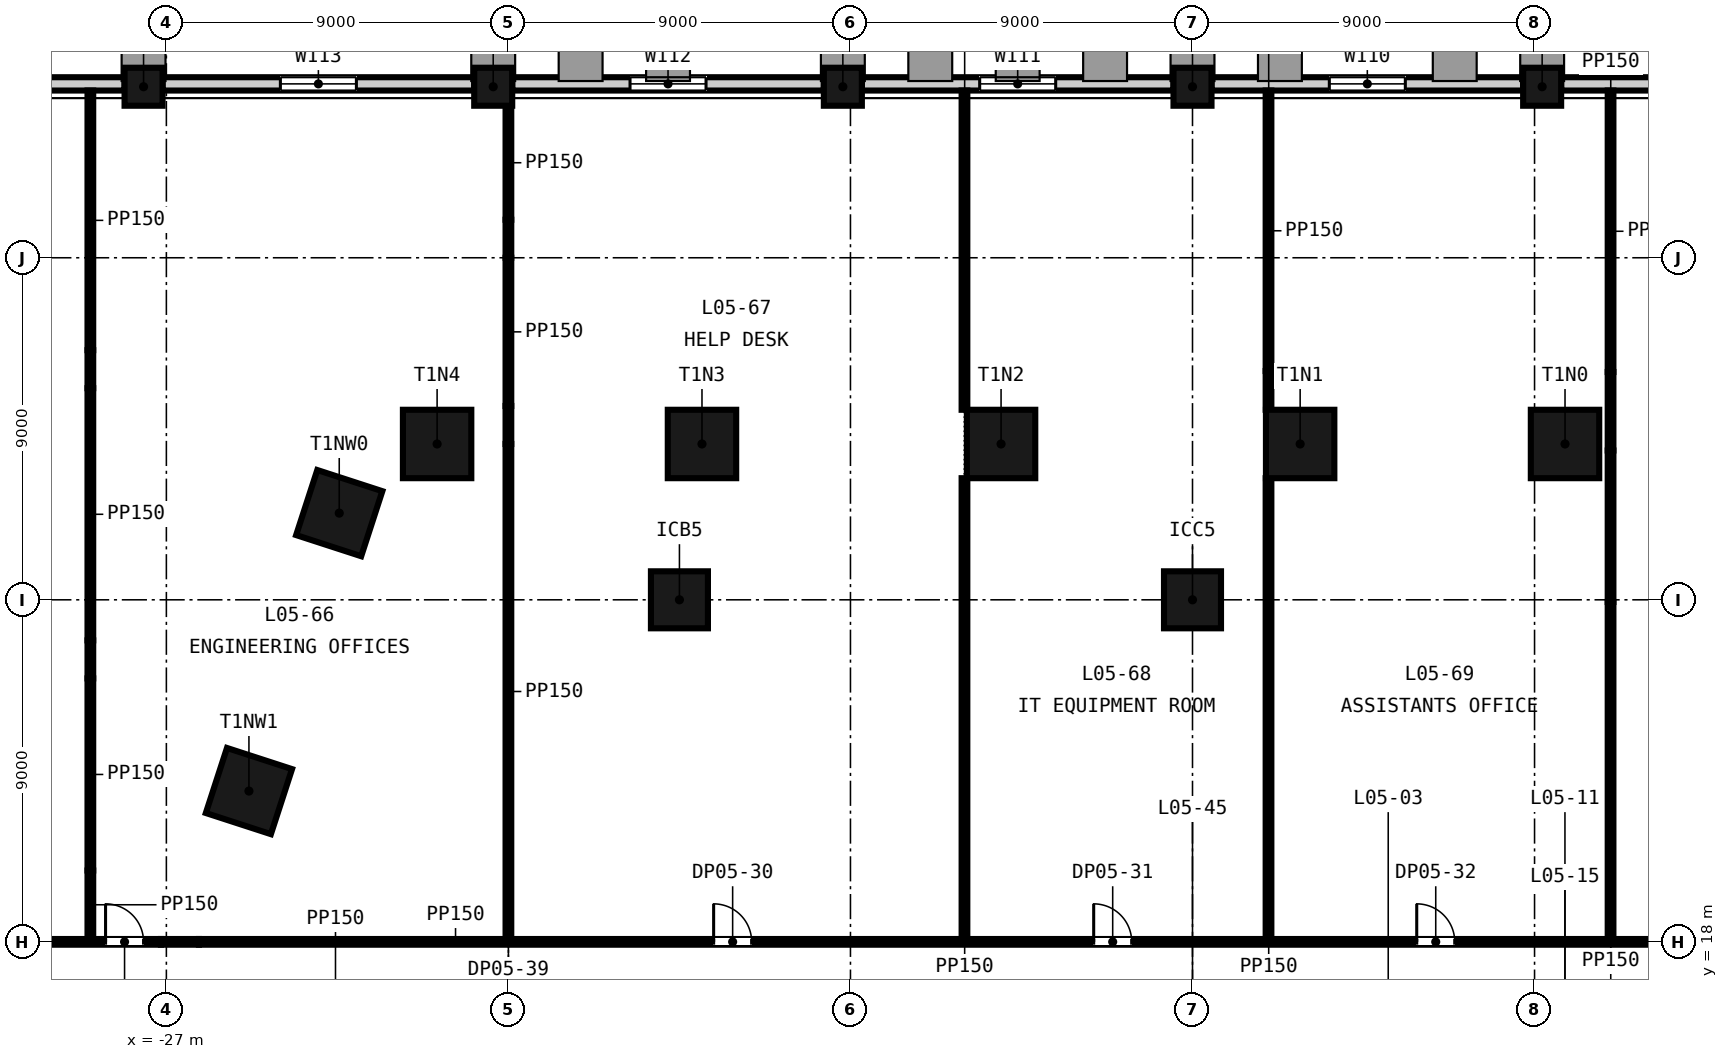
"""IFC4 building model, lengths in metres.
Left out: names, types, materials, properties, quantities, classifications, styles, units other than length and angle.
Written with IfcOpenShell. Run it as: python <this file> out.ifc"""

import sys

from ifc_helpers import new_model, si_unit, direction, frame, frame_2d, origin, origin_2d, place, context, subcontext, project, spatial, rectangle, extrude, element, fill, save


model = new_model("IFC4")
c1 = context("Model", 3, precision=1e-05, world=origin(), true_north=direction((0.0, 1.0)))
c2 = subcontext(c1, "Body", "Model", "MODEL_VIEW")
j1 = project(units=[si_unit("LENGTHUNIT", "METRE"), si_unit("PLANEANGLEUNIT", "RADIAN")], contexts=[c1])
p1 = place(None, origin())
s1 = spatial("IfcSite", under=j1, at=p1, CompositionType="ELEMENT")
p2 = place(p1, origin())
s2 = spatial("IfcBuilding", under=s1, at=p2, CompositionType="ELEMENT")
p3 = place(p2, frame((0.0, 0.0, 31.5)))
s3 = spatial("IfcBuildingStorey", under=s2, at=p3, CompositionType="ELEMENT", Elevation=31.5)
for number, where, z_axis, x_axis in (
    (1, (9.802, 31.1, -0.3), (0.0, 0.0, 1.0), (-1.0, 0.0, 0.0)),
    (2, (2.832, 31.1, -0.3), (0.0, 0.0, 1.0), (-1.0, 0.0, 0.0)),
    (3, (-5.037, 31.1, -0.3), (0.0, 0.0, 1.0), (-1.0, 0.0, 0.0)),
    (4, (-12.907, 31.1, -0.3), (0.0, 0.0, 1.0), (-1.0, 0.0, 0.0)),
    (5, (-19.876, 31.1, -0.3), (0.0, 0.0, 1.0), (-1.0, 0.0, 0.0)),
    (6, (-22.451, 29.281, -0.3), (0.0, 0.0, 1.0), (-0.309, -0.951, 0.0)),
    (7, (-24.827, 21.968, -0.3), (0.0, 0.0, 1.0), (-0.309, -0.951, 0.0)),
):
    element("IfcColumn", number, at=place(p3, frame(where, z_axis=z_axis, x_axis=x_axis)), inside=s3, PredefinedType="COLUMN", context=c2, shape_type="SweptSolid", body=[
        extrude(rectangle(XDim=1.8, YDim=1.8, at=origin_2d()), origin(), (0.0, 0.0, 1.0), 4.65),
    ])
for number, where, z_axis, x_axis in (
    (8, (-13.5, 27.0, -0.3), (0.0, 0.0, 1.0), (1.0, 0.0, 0.0)),
    (9, (0.0, 27.0, -0.3), (0.0, 0.0, 1.0), (1.0, 0.0, 0.0)),
):
    element("IfcColumn", number, at=place(p3, frame(where, z_axis=z_axis, x_axis=x_axis)), inside=s3, PredefinedType="COLUMN", context=c2, shape_type="SweptSolid", body=[
        extrude(rectangle(XDim=1.5, YDim=1.5, at=origin_2d()), origin(), (0.0, 0.0, 1.0), 4.65),
    ])
for number, where, z_axis, x_axis in (
    (10, (9.2, 40.5, -0.3), (0.0, 0.0, 1.0), (-1.0, 0.0, 0.0)),
    (11, (0.0, 40.5, -0.3), (0.0, 0.0, 1.0), (-1.0, 0.0, 0.0)),
    (12, (-9.2, 40.5, -0.3), (0.0, 0.0, 1.0), (-1.0, 0.0, 0.0)),
    (13, (-18.4, 40.5, -0.3), (0.0, 0.0, 1.0), (-1.0, 0.0, 0.0)),
    (14, (-27.6, 40.5, -0.3), (0.0, 0.0, 1.0), (-1.0, 0.0, 0.0)),
):
    element("IfcColumn", number, at=place(p3, frame(where, z_axis=z_axis, x_axis=x_axis)), inside=s3, PredefinedType="COLUMN", context=c2, shape_type="SweptSolid", body=[
        extrude(rectangle(XDim=1.0, YDim=1.0, at=origin_2d()), origin(), (0.0, 0.0, 1.0), 4.65),
    ])
p4 = place(p3, frame((17.9, 40.575, -0.3), z_axis=(0.0, 0.0, 1.0), x_axis=(-1.0, 0.0, 0.0)))
e15 = element("IfcWall", 15, at=p4, inside=s3, PredefinedType="SOLIDWALL", context=c2, shape_type="SweptSolid", body=[
    extrude(rectangle(XDim=8.2, YDim=0.35, at=frame_2d((4.1, 0.0))), origin(), (0.0, 0.0, 1.0), 3.75),
])
p5 = place(p4, frame((3.1, 0.0, 1.2)))
e16 = element("IfcOpeningElement", 16, at=p5, cuts=e15, PredefinedType="OPENING", context=c2, shape_type="SweptSolid", body=[
    extrude(rectangle(XDim=2.0, YDim=2.5, at=frame_2d((1.0, 1.25))), frame((0.0, 0.185, 0.0), z_axis=(0.0, -1.0, 0.0), x_axis=(1.0, 0.0, 0.0)), (0.0, 0.0, 1.0), 0.37),
])
p6 = place(p3, frame((8.7, 40.575, -0.3), z_axis=(0.0, 0.0, 1.0), x_axis=(-1.0, 0.0, 0.0)))
e17 = element("IfcWall", 17, at=p6, inside=s3, PredefinedType="SOLIDWALL", context=c2, shape_type="SweptSolid", body=[
    extrude(rectangle(XDim=8.2, YDim=0.35, at=frame_2d((4.1, 0.0))), origin(), (0.0, 0.0, 1.0), 3.75),
])
p7 = place(p6, frame((3.1, 0.0, 1.2)))
e18 = element("IfcOpeningElement", 18, at=p7, cuts=e17, PredefinedType="OPENING", context=c2, shape_type="SweptSolid", body=[
    extrude(rectangle(XDim=2.0, YDim=2.5, at=frame_2d((1.0, 1.25))), frame((0.0, 0.185, 0.0), z_axis=(0.0, -1.0, 0.0), x_axis=(1.0, 0.0, 0.0)), (0.0, 0.0, 1.0), 0.37),
])
p8 = place(p3, frame((-0.5, 40.575, -0.3), z_axis=(0.0, 0.0, 1.0), x_axis=(-1.0, 0.0, 0.0)))
e19 = element("IfcWall", 19, at=p8, inside=s3, PredefinedType="SOLIDWALL", context=c2, shape_type="SweptSolid", body=[
    extrude(rectangle(XDim=8.2, YDim=0.35, at=frame_2d((4.1, 0.0))), origin(), (0.0, 0.0, 1.0), 3.75),
])
p9 = place(p8, frame((3.1, 0.0, 1.2)))
e20 = element("IfcOpeningElement", 20, at=p9, cuts=e19, PredefinedType="OPENING", context=c2, shape_type="SweptSolid", body=[
    extrude(rectangle(XDim=2.0, YDim=2.5, at=frame_2d((1.0, 1.25))), frame((0.0, 0.185, 0.0), z_axis=(0.0, -1.0, 0.0), x_axis=(1.0, 0.0, 0.0)), (0.0, 0.0, 1.0), 0.37),
])
p10 = place(p3, frame((-9.7, 40.575, -0.3), z_axis=(0.0, 0.0, 1.0), x_axis=(-1.0, 0.0, 0.0)))
e21 = element("IfcWall", 21, at=p10, inside=s3, PredefinedType="SOLIDWALL", context=c2, shape_type="SweptSolid", body=[
    extrude(rectangle(XDim=8.2, YDim=0.35, at=frame_2d((4.1, 0.0))), origin(), (0.0, 0.0, 1.0), 3.75),
])
p11 = place(p10, frame((3.1, 0.0, 1.2)))
e22 = element("IfcOpeningElement", 22, at=p11, cuts=e21, PredefinedType="OPENING", context=c2, shape_type="SweptSolid", body=[
    extrude(rectangle(XDim=2.0, YDim=2.5, at=frame_2d((1.0, 1.25))), frame((0.0, 0.185, 0.0), z_axis=(0.0, -1.0, 0.0), x_axis=(1.0, 0.0, 0.0)), (0.0, 0.0, 1.0), 0.37),
])
p12 = place(p3, frame((-18.9, 40.575, -0.3), z_axis=(0.0, 0.0, 1.0), x_axis=(-1.0, 0.0, 0.0)))
e23 = element("IfcWall", 23, at=p12, inside=s3, PredefinedType="SOLIDWALL", context=c2, shape_type="SweptSolid", body=[
    extrude(rectangle(XDim=8.2, YDim=0.35, at=frame_2d((4.1, 0.0))), origin(), (0.0, 0.0, 1.0), 3.75),
])
p13 = place(p12, frame((3.1, 0.0, 1.2)))
e24 = element("IfcOpeningElement", 24, at=p13, cuts=e23, PredefinedType="OPENING", context=c2, shape_type="SweptSolid", body=[
    extrude(rectangle(XDim=2.0, YDim=2.5, at=frame_2d((1.0, 1.25))), frame((0.0, 0.185, 0.0), z_axis=(0.0, -1.0, 0.0), x_axis=(1.0, 0.0, 0.0)), (0.0, 0.0, 1.0), 0.37),
])
p14 = place(p3, frame((-28.1, 40.575, -0.3), z_axis=(0.0, 0.0, 1.0), x_axis=(-1.0, 0.0, 0.0)))
e25 = element("IfcWall", 25, at=p14, inside=s3, PredefinedType="SOLIDWALL", context=c2, shape_type="SweptSolid", body=[
    extrude(rectangle(XDim=8.2, YDim=0.35, at=frame_2d((4.1, 0.0))), origin(), (0.0, 0.0, 1.0), 3.75),
])
p15 = place(p14, frame((3.1, 0.0, 1.2)))
e26 = element("IfcOpeningElement", 26, at=p15, cuts=e25, PredefinedType="OPENING", context=c2, shape_type="SweptSolid", body=[
    extrude(rectangle(XDim=2.0, YDim=2.5, at=frame_2d((1.0, 1.25))), frame((0.0, 0.185, 0.0), z_axis=(0.0, -1.0, 0.0), x_axis=(1.0, 0.0, 0.0)), (0.0, 0.0, 1.0), 0.37),
])
p16 = place(p3, frame((-35.879, 18.0, 0.0), z_axis=(0.0, 0.0, 1.0), x_axis=(1.0, 0.0, 0.0)))
e27 = element("IfcWall", 27, at=p16, inside=s3, PredefinedType="PARTITIONING", context=c2, shape_type="SweptSolid", body=[
    extrude(rectangle(XDim=8.736, YDim=0.15, at=frame_2d((4.368, 0.0))), origin(), (0.0, 0.0, 1.0), 4.35),
])
p17 = place(p16, frame((7.279, 0.0, 0.0)))
e28 = element("IfcOpeningElement", 28, at=p17, cuts=e27, PredefinedType="OPENING", context=c2, shape_type="SweptSolid", body=[
    extrude(rectangle(XDim=1.0, YDim=2.1, at=frame_2d((0.5, 1.05))), frame((0.0, 0.085, 0.0), z_axis=(0.0, -1.0, 0.0), x_axis=(1.0, 0.0, 0.0)), (0.0, 0.0, 1.0), 0.17),
])
p18 = place(p3, frame((-27.142, 18.0, 0.0), z_axis=(0.0, 0.0, 1.0), x_axis=(1.0, 0.0, 0.0)))
e29 = element("IfcWall", 29, at=p18, inside=s3, PredefinedType="PARTITIONING", context=c2, shape_type="SweptSolid", body=[
    extrude(rectangle(XDim=1.0, YDim=0.15, at=frame_2d((0.5, 0.0))), origin(), (0.0, 0.0, 1.0), 3.5),
])
p19 = place(p3, frame((-26.142, 18.0, 0.0), z_axis=(0.0, 0.0, 1.0), x_axis=(1.0, 0.0, 0.0)))
e30 = element("IfcWall", 30, at=p19, inside=s3, PredefinedType="PARTITIONING", context=c2, shape_type="SweptSolid", body=[
    extrude(rectangle(XDim=44.067, YDim=0.15, at=frame_2d((22.034, 0.0))), origin(), (0.0, 0.0, 1.0), 4.35),
])
p20 = place(p19, frame((13.542, 0.0, 0.0)))
e31 = element("IfcOpeningElement", 31, at=p20, cuts=e30, PredefinedType="OPENING", context=c2, shape_type="SweptSolid", body=[
    extrude(rectangle(XDim=1.0, YDim=2.1, at=frame_2d((0.5, 1.05))), frame((0.0, 0.085, 0.0), z_axis=(0.0, -1.0, 0.0), x_axis=(1.0, 0.0, 0.0)), (0.0, 0.0, 1.0), 0.17),
])
p21 = place(p19, frame((23.542, 0.0, 0.0)))
e32 = element("IfcOpeningElement", 32, at=p21, cuts=e30, PredefinedType="OPENING", context=c2, shape_type="SweptSolid", body=[
    extrude(rectangle(XDim=1.0, YDim=2.1, at=frame_2d((0.5, 1.05))), frame((0.0, 0.085, 0.0), z_axis=(0.0, -1.0, 0.0), x_axis=(1.0, 0.0, 0.0)), (0.0, 0.0, 1.0), 0.17),
])
p22 = place(p19, frame((32.042, 0.0, 0.0)))
e33 = element("IfcOpeningElement", 33, at=p22, cuts=e30, PredefinedType="OPENING", context=c2, shape_type="SweptSolid", body=[
    extrude(rectangle(XDim=1.0, YDim=2.1, at=frame_2d((0.5, 1.05))), frame((0.0, 0.085, 0.0), z_axis=(0.0, -1.0, 0.0), x_axis=(1.0, 0.0, 0.0)), (0.0, 0.0, 1.0), 0.17),
])
p23 = place(p19, frame((39.042, 0.0, 0.0)))
e34 = element("IfcOpeningElement", 34, at=p23, cuts=e30, PredefinedType="OPENING", context=c2, shape_type="SweptSolid", body=[
    extrude(rectangle(XDim=1.0, YDim=2.1, at=frame_2d((0.5, 1.05))), frame((0.0, 0.085, 0.0), z_axis=(0.0, -1.0, 0.0), x_axis=(1.0, 0.0, 0.0)), (0.0, 0.0, 1.0), 0.17),
])
p24 = place(p19, frame((42.542, 0.0, 0.0)))
e35 = element("IfcOpeningElement", 35, at=p24, cuts=e30, PredefinedType="OPENING", context=c2, shape_type="SweptSolid", body=[
    extrude(rectangle(XDim=1.0, YDim=2.1, at=frame_2d((0.5, 1.05))), frame((0.0, 0.085, 0.0), z_axis=(0.0, -1.0, 0.0), x_axis=(1.0, 0.0, 0.0)), (0.0, 0.0, 1.0), 0.17),
])
p25 = place(p3, frame((-29.0, 18.075, 0.0), z_axis=(0.0, 0.0, 1.0), x_axis=(0.0, 1.0, 0.0)))
e36 = element("IfcWall", 36, at=p25, inside=s3, PredefinedType="PARTITIONING", context=c2, shape_type="SweptSolid", body=[
    extrude(rectangle(XDim=1.802, YDim=0.15, at=frame_2d((0.901, 0.0))), origin(), (0.0, 0.0, 1.0), 3.261),
])
p26 = place(p3, frame((-29.0, 19.877, 0.0), z_axis=(0.0, 0.0, 1.0), x_axis=(0.0, 1.0, 0.0)))
e37 = element("IfcWall", 37, at=p26, inside=s3, PredefinedType="PARTITIONING", context=c2, shape_type="SweptSolid", body=[
    extrude(rectangle(XDim=5.055, YDim=0.15, at=frame_2d((2.528, 0.0))), origin(), (0.0, 0.0, 1.0), 4.35),
])
p27 = place(p3, frame((-29.0, 24.932, 0.0), z_axis=(0.0, 0.0, 1.0), x_axis=(0.0, 1.0, 0.0)))
e38 = element("IfcWall", 38, at=p27, inside=s3, PredefinedType="PARTITIONING", context=c2, shape_type="SweptSolid", body=[
    extrude(rectangle(XDim=1.0, YDim=0.15, at=frame_2d((0.5, 0.0))), origin(), (0.0, 0.0, 1.0), 3.261),
])
p28 = place(p3, frame((-29.0, 25.932, 0.0), z_axis=(0.0, 0.0, 1.0), x_axis=(0.0, 1.0, 0.0)))
e39 = element("IfcWall", 39, at=p28, inside=s3, PredefinedType="PARTITIONING", context=c2, shape_type="SweptSolid", body=[
    extrude(rectangle(XDim=6.636, YDim=0.15, at=frame_2d((3.318, 0.0))), origin(), (0.0, 0.0, 1.0), 4.35),
])
p29 = place(p3, frame((-29.0, 32.568, 0.0), z_axis=(0.0, 0.0, 1.0), x_axis=(0.0, 1.0, 0.0)))
e40 = element("IfcWall", 40, at=p29, inside=s3, PredefinedType="PARTITIONING", context=c2, shape_type="SweptSolid", body=[
    extrude(rectangle(XDim=1.0, YDim=0.15, at=frame_2d((0.5, 0.0))), origin(), (0.0, 0.0, 1.0), 3.448),
])
p30 = place(p3, frame((-29.0, 33.568, 0.0), z_axis=(0.0, 0.0, 1.0), x_axis=(0.0, 1.0, 0.0)))
e41 = element("IfcWall", 41, at=p30, inside=s3, PredefinedType="PARTITIONING", context=c2, shape_type="SweptSolid", body=[
    extrude(rectangle(XDim=6.832, YDim=0.15, at=frame_2d((3.416, 0.0))), origin(), (0.0, 0.0, 1.0), 4.35),
])
p31 = place(p3, frame((-18.0, 18.075, 0.0), z_axis=(0.0, 0.0, 1.0), x_axis=(0.0, 1.0, 0.0)))
e42 = element("IfcWall", 42, at=p31, inside=s3, PredefinedType="PARTITIONING", context=c2, shape_type="SweptSolid", body=[
    extrude(rectangle(XDim=13.025, YDim=0.15, at=frame_2d((6.513, 0.0))), origin(), (0.0, 0.0, 1.0), 4.35),
])
p32 = place(p3, frame((-18.0, 31.1, 0.0), z_axis=(0.0, 0.0, 1.0), x_axis=(0.0, 1.0, 0.0)))
e43 = element("IfcWall", 43, at=p32, inside=s3, PredefinedType="PARTITIONING", context=c2, shape_type="SweptSolid", body=[
    extrude(rectangle(XDim=1.0, YDim=0.15, at=frame_2d((0.5, 0.0))), origin(), (0.0, 0.0, 1.0), 3.5),
])
p33 = place(p3, frame((-18.0, 32.1, 0.0), z_axis=(0.0, 0.0, 1.0), x_axis=(0.0, 1.0, 0.0)))
e44 = element("IfcWall", 44, at=p33, inside=s3, PredefinedType="PARTITIONING", context=c2, shape_type="SweptSolid", body=[
    extrude(rectangle(XDim=3.9, YDim=0.15, at=frame_2d((1.95, 0.0))), origin(), (0.0, 0.0, 1.0), 4.35),
])
p34 = place(p3, frame((-18.0, 36.0, 0.0), z_axis=(0.0, 0.0, 1.0), x_axis=(0.0, 1.0, 0.0)))
e45 = element("IfcWall", 45, at=p34, inside=s3, PredefinedType="PARTITIONING", context=c2, shape_type="SweptSolid", body=[
    extrude(rectangle(XDim=1.0, YDim=0.15, at=frame_2d((0.5, 0.0))), origin(), (0.0, 0.0, 1.0), 3.747),
])
p35 = place(p3, frame((-18.0, 37.0, 0.0), z_axis=(0.0, 0.0, 1.0), x_axis=(0.0, 1.0, 0.0)))
e46 = element("IfcWall", 46, at=p35, inside=s3, PredefinedType="PARTITIONING", context=c2, shape_type="SweptSolid", body=[
    extrude(rectangle(XDim=3.0, YDim=0.15, at=frame_2d((1.5, 0.0))), origin(), (0.0, 0.0, 1.0), 4.35),
])
p36 = place(p3, frame((-6.0, 18.075, 0.0), z_axis=(0.0, 0.0, 1.0), x_axis=(0.0, 1.0, 0.0)))
e47 = element("IfcWall", 47, at=p36, inside=s3, PredefinedType="PARTITIONING", context=c2, shape_type="SweptSolid", body=[
    extrude(rectangle(XDim=12.125, YDim=0.15, at=frame_2d((6.062, 0.0))), origin(), (0.0, 0.0, 1.0), 4.35),
])
p37 = place(p3, frame((-6.0, 32.0, 0.0), z_axis=(0.0, 0.0, 1.0), x_axis=(0.0, 1.0, 0.0)))
e48 = element("IfcWall", 48, at=p37, inside=s3, PredefinedType="PARTITIONING", context=c2, shape_type="SweptSolid", body=[
    extrude(rectangle(XDim=8.4, YDim=0.15, at=frame_2d((4.2, 0.0))), origin(), (0.0, 0.0, 1.0), 4.35),
])
p38 = place(p3, frame((2.0, 18.075, 0.0), z_axis=(0.0, 0.0, 1.0), x_axis=(0.0, 1.0, 0.0)))
e49 = element("IfcWall", 49, at=p38, inside=s3, PredefinedType="PARTITIONING", context=c2, shape_type="SweptSolid", body=[
    extrude(rectangle(XDim=12.125, YDim=0.15, at=frame_2d((6.062, 0.0))), origin(), (0.0, 0.0, 1.0), 4.35),
])
p39 = place(p3, frame((2.0, 32.0, 0.0), z_axis=(0.0, 0.0, 1.0), x_axis=(0.0, 1.0, 0.0)))
e50 = element("IfcWall", 50, at=p39, inside=s3, PredefinedType="PARTITIONING", context=c2, shape_type="SweptSolid", body=[
    extrude(rectangle(XDim=1.02, YDim=0.15, at=frame_2d((0.51, 0.0))), origin(), (0.0, 0.0, 1.0), 3.75),
])
p40 = place(p3, frame((2.0, 33.02, 0.0), z_axis=(0.0, 0.0, 1.0), x_axis=(0.0, 1.0, 0.0)))
e51 = element("IfcWall", 51, at=p40, inside=s3, PredefinedType="PARTITIONING", context=c2, shape_type="SweptSolid", body=[
    extrude(rectangle(XDim=7.38, YDim=0.15, at=frame_2d((3.69, 0.0))), origin(), (0.0, 0.0, 1.0), 4.35),
])
p41 = place(p3, frame((11.0, 18.075, 0.0), z_axis=(0.0, 0.0, 1.0), x_axis=(0.0, 1.0, 0.0)))
e52 = element("IfcWall", 52, at=p41, inside=s3, PredefinedType="PARTITIONING", context=c2, shape_type="SweptSolid", body=[
    extrude(rectangle(XDim=8.868, YDim=0.15, at=frame_2d((4.434, 0.0))), origin(), (0.0, 0.0, 1.0), 3.671),
])
p42 = place(p3, frame((11.0, 26.943, 0.0), z_axis=(0.0, 0.0, 1.0), x_axis=(0.0, 1.0, 0.0)))
e53 = element("IfcWall", 53, at=p42, inside=s3, PredefinedType="PARTITIONING", context=c2, shape_type="SweptSolid", body=[
    extrude(rectangle(XDim=3.985, YDim=0.15, at=frame_2d((1.993, 0.0))), origin(), (0.0, 0.0, 1.0), 4.35),
])
p43 = place(p3, frame((11.0, 30.928, 0.0), z_axis=(0.0, 0.0, 1.0), x_axis=(0.0, 1.0, 0.0)))
e54 = element("IfcWall", 54, at=p43, inside=s3, PredefinedType="PARTITIONING", context=c2, shape_type="SweptSolid", body=[
    extrude(rectangle(XDim=2.065, YDim=0.15, at=frame_2d((1.033, 0.0))), origin(), (0.0, 0.0, 1.0), 3.5),
])
p44 = place(p3, frame((11.0, 32.994, 0.0), z_axis=(0.0, 0.0, 1.0), x_axis=(0.0, 1.0, 0.0)))
e55 = element("IfcWall", 55, at=p44, inside=s3, PredefinedType="PARTITIONING", context=c2, shape_type="SweptSolid", body=[
    extrude(rectangle(XDim=7.406, YDim=0.15, at=frame_2d((3.703, 0.0))), origin(), (0.0, 0.0, 1.0), 4.35),
])
p45 = place(p7, origin())
e56 = element("IfcWindow", 56, at=p45, inside=s3, PartitioningType="SINGLE_PANEL", PredefinedType="WINDOW", context=c2, shape_type="SweptSolid", body=[
    extrude(rectangle(XDim=2.0, YDim=2.5, at=frame_2d((1.0, 1.25))), frame((0.0, 0.03, 0.0), z_axis=(0.0, -1.0, 0.0), x_axis=(1.0, 0.0, 0.0)), (0.0, 0.0, 1.0), 0.06),
])
fill(e18, e56)
p46 = place(p9, origin())
e57 = element("IfcWindow", 57, at=p46, inside=s3, PartitioningType="SINGLE_PANEL", PredefinedType="WINDOW", context=c2, shape_type="SweptSolid", body=[
    extrude(rectangle(XDim=2.0, YDim=2.5, at=frame_2d((1.0, 1.25))), frame((0.0, 0.03, 0.0), z_axis=(0.0, -1.0, 0.0), x_axis=(1.0, 0.0, 0.0)), (0.0, 0.0, 1.0), 0.06),
])
fill(e20, e57)
p47 = place(p11, origin())
e58 = element("IfcWindow", 58, at=p47, inside=s3, PartitioningType="SINGLE_PANEL", PredefinedType="WINDOW", context=c2, shape_type="SweptSolid", body=[
    extrude(rectangle(XDim=2.0, YDim=2.5, at=frame_2d((1.0, 1.25))), frame((0.0, 0.03, 0.0), z_axis=(0.0, -1.0, 0.0), x_axis=(1.0, 0.0, 0.0)), (0.0, 0.0, 1.0), 0.06),
])
fill(e22, e58)
p48 = place(p13, origin())
e59 = element("IfcWindow", 59, at=p48, inside=s3, PartitioningType="SINGLE_PANEL", PredefinedType="WINDOW", context=c2, shape_type="SweptSolid", body=[
    extrude(rectangle(XDim=2.0, YDim=2.5, at=frame_2d((1.0, 1.25))), frame((0.0, 0.03, 0.0), z_axis=(0.0, -1.0, 0.0), x_axis=(1.0, 0.0, 0.0)), (0.0, 0.0, 1.0), 0.06),
])
fill(e24, e59)
p49 = place(p17, origin())
e60 = element("IfcDoor", 60, at=p49, inside=s3, OperationType="SINGLE_SWING_LEFT", PredefinedType="DOOR", context=c2, shape_type="SweptSolid", body=[
    extrude(rectangle(XDim=1.0, YDim=2.1, at=frame_2d((0.5, 1.05))), frame((0.0, 0.025, 0.0), z_axis=(0.0, -1.0, 0.0), x_axis=(1.0, 0.0, 0.0)), (0.0, 0.0, 1.0), 0.05),
])
fill(e28, e60)
p50 = place(p20, origin())
e61 = element("IfcDoor", 61, at=p50, inside=s3, OperationType="SINGLE_SWING_LEFT", PredefinedType="DOOR", context=c2, shape_type="SweptSolid", body=[
    extrude(rectangle(XDim=1.0, YDim=2.1, at=frame_2d((0.5, 1.05))), frame((0.0, 0.025, 0.0), z_axis=(0.0, -1.0, 0.0), x_axis=(1.0, 0.0, 0.0)), (0.0, 0.0, 1.0), 0.05),
])
fill(e31, e61)
p51 = place(p21, origin())
e62 = element("IfcDoor", 62, at=p51, inside=s3, OperationType="SINGLE_SWING_LEFT", PredefinedType="DOOR", context=c2, shape_type="SweptSolid", body=[
    extrude(rectangle(XDim=1.0, YDim=2.1, at=frame_2d((0.5, 1.05))), frame((0.0, 0.025, 0.0), z_axis=(0.0, -1.0, 0.0), x_axis=(1.0, 0.0, 0.0)), (0.0, 0.0, 1.0), 0.05),
])
fill(e32, e62)
p52 = place(p22, origin())
e63 = element("IfcDoor", 63, at=p52, inside=s3, OperationType="SINGLE_SWING_LEFT", PredefinedType="DOOR", context=c2, shape_type="SweptSolid", body=[
    extrude(rectangle(XDim=1.0, YDim=2.1, at=frame_2d((0.5, 1.05))), frame((0.0, 0.025, 0.0), z_axis=(0.0, -1.0, 0.0), x_axis=(1.0, 0.0, 0.0)), (0.0, 0.0, 1.0), 0.05),
])
fill(e33, e63)
save(model, sys.argv[1])
